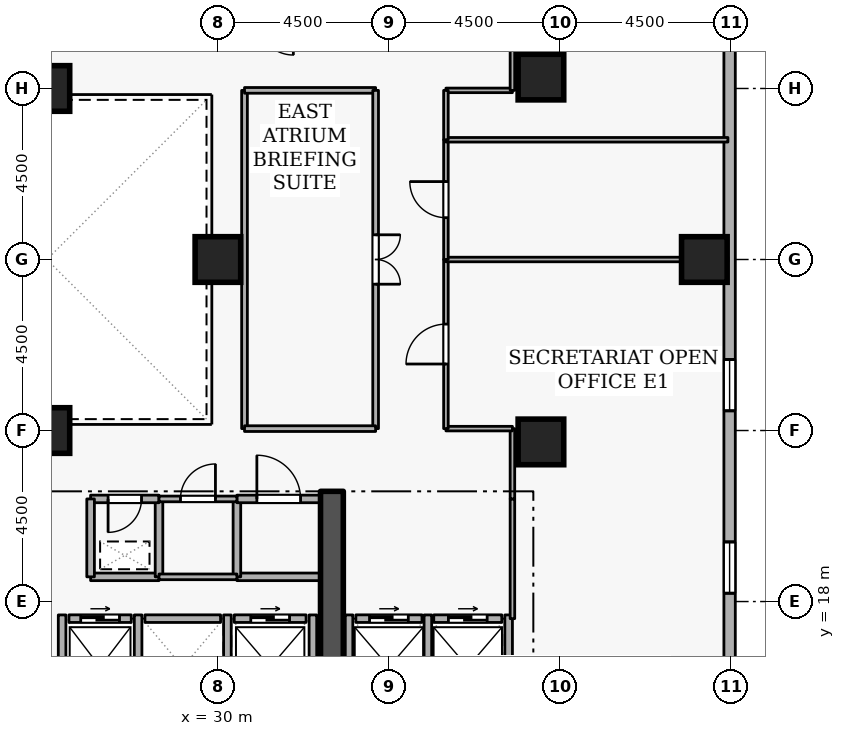
"""IFC4 building model, lengths in metres.
Left out: names, types, materials, properties, quantities, classifications, styles, units other than length and angle.
Written with IfcOpenShell. Run it as: python <this file> out.ifc"""

import sys

from ifc_helpers import new_model, si_unit, direction, frame, frame_2d, origin, origin_2d, place, context, subcontext, project, spatial, rectangle, extrude, element, fill, save


model = new_model("IFC4")
c1 = context("Model", 3, precision=1e-05, world=origin(), true_north=direction((0.0, 1.0)))
c2 = subcontext(c1, "Body", "Model", "MODEL_VIEW")
j1 = project(units=[si_unit("LENGTHUNIT", "METRE"), si_unit("PLANEANGLEUNIT", "RADIAN")], contexts=[c1])
p1 = place(None, origin())
s1 = spatial("IfcSite", under=j1, at=p1, CompositionType="ELEMENT")
p2 = place(p1, origin())
s2 = spatial("IfcBuilding", under=s1, at=p2, CompositionType="ELEMENT")
p3 = place(p2, frame((0.0, 0.0, 116.1)))
s3 = spatial("IfcBuildingStorey", under=s2, at=p3, CompositionType="ELEMENT", Elevation=116.1)
p4 = place(p3, frame((33.0, 15.2, 0.0), z_axis=(0.0, 0.0, 1.0), x_axis=(0.0, 1.0, 0.0)))
e1 = element("IfcWall", 1, at=p4, inside=s3, PredefinedType="SHEAR", context=c2, shape_type="SweptSolid", body=[
    extrude(rectangle(XDim=5.7, YDim=0.6, at=frame_2d((2.85, 0.0))), origin(), (0.0, 0.0, 1.0), 3.6),
])
for number, where, z_axis, x_axis in (
    (2, (42.8, 27.0, 0.0), (0.0, 0.0, 1.0), (1.0, 0.0, 0.0)),
    (3, (38.5, 22.2, 0.0), (0.0, 0.0, 1.0), (1.0, 0.0, 0.0)),
    (4, (38.5, 31.8, 0.0), (0.0, 0.0, 1.0), (1.0, 0.0, 0.0)),
    (5, (25.5, 22.5, 0.0), (0.0, 0.0, 1.0), (1.0, 0.0, 0.0)),
    (6, (25.5, 31.5, 0.0), (0.0, 0.0, 1.0), (1.0, 0.0, 0.0)),
    (7, (30.0, 27.0, 0.0), (0.0, 0.0, 1.0), (1.0, 0.0, 0.0)),
):
    element("IfcColumn", number, at=place(p3, frame(where, z_axis=z_axis, x_axis=x_axis)), inside=s3, PredefinedType="COLUMN", context=c2, shape_type="SweptSolid", body=[
        extrude(rectangle(XDim=1.2, YDim=1.2, at=origin_2d()), origin(), (0.0, 0.0, 1.0), 3.6),
    ])
p5 = place(p3, frame((43.465, 11.619, 0.0), z_axis=(0.0, 0.0, 1.0), x_axis=(0.0, 1.0, 0.0)))
e8 = element("IfcWall", 8, at=p5, inside=s3, PredefinedType="STANDARD", context=c2, shape_type="SweptSolid", body=[
    extrude(rectangle(XDim=36.763, YDim=0.3, at=frame_2d((18.381, 0.0))), origin(), (0.0, 0.0, 1.0), 2.22),
])
p6 = place(p5, frame((6.6, 0.0, 0.72)))
e9 = element("IfcOpeningElement", 9, at=p6, cuts=e8, PredefinedType="OPENING", context=c2, shape_type="SweptSolid", body=[
    extrude(rectangle(XDim=1.35, YDim=1.05, at=frame_2d((0.675, 0.525))), frame((0.0, 0.16, 0.0), z_axis=(0.0, -1.0, 0.0), x_axis=(1.0, 0.0, 0.0)), (0.0, 0.0, 1.0), 0.32),
])
p7 = place(p5, frame((11.4, 0.0, 0.72)))
e10 = element("IfcOpeningElement", 10, at=p7, cuts=e8, PredefinedType="OPENING", context=c2, shape_type="SweptSolid", body=[
    extrude(rectangle(XDim=1.35, YDim=1.05, at=frame_2d((0.675, 0.525))), frame((0.0, 0.16, 0.0), z_axis=(0.0, -1.0, 0.0), x_axis=(1.0, 0.0, 0.0)), (0.0, 0.0, 1.0), 0.32),
])
p8 = place(p5, frame((21.0, 0.0, 0.72)))
e11 = element("IfcOpeningElement", 11, at=p8, cuts=e8, PredefinedType="OPENING", context=c2, shape_type="SweptSolid", body=[
    extrude(rectangle(XDim=1.35, YDim=1.05, at=frame_2d((0.675, 0.525))), frame((0.0, 0.16, 0.0), z_axis=(0.0, -1.0, 0.0), x_axis=(1.0, 0.0, 0.0)), (0.0, 0.0, 1.0), 0.32),
])
p9 = place(p5, frame((25.8, 0.0, 0.72)))
e12 = element("IfcOpeningElement", 12, at=p9, cuts=e8, PredefinedType="OPENING", context=c2, shape_type="SweptSolid", body=[
    extrude(rectangle(XDim=1.35, YDim=1.05, at=frame_2d((0.675, 0.525))), frame((0.0, 0.16, 0.0), z_axis=(0.0, -1.0, 0.0), x_axis=(1.0, 0.0, 0.0)), (0.0, 0.0, 1.0), 0.32),
])
p10 = place(p3, frame((26.08, 17.55, 0.0), z_axis=(0.0, 0.0, 1.0), x_axis=(1.0, 0.0, 0.0)))
e13 = element("IfcWall", 13, at=p10, inside=s3, PredefinedType="STANDARD", context=c2, shape_type="SweptSolid", body=[
    extrude(rectangle(XDim=1.64, YDim=0.2, at=frame_2d((0.82, 0.0))), origin(), (0.0, 0.0, 1.0), 3.32),
])
p11 = place(p10, frame((0.31, 0.0, 0.0)))
e14 = element("IfcOpeningElement", 14, at=p11, cuts=e13, PredefinedType="OPENING", context=c2, shape_type="SweptSolid", body=[
    extrude(rectangle(XDim=1.02, YDim=2.06, at=frame_2d((0.51, 1.03))), frame((0.0, 0.11, 0.0), z_axis=(0.0, -1.0, 0.0), x_axis=(1.0, 0.0, 0.0)), (0.0, 0.0, 1.0), 0.22),
])
p12 = place(p3, frame((28.08, 17.55, 0.0), z_axis=(0.0, 0.0, 1.0), x_axis=(1.0, 0.0, 0.0)))
e15 = element("IfcWall", 15, at=p12, inside=s3, PredefinedType="STANDARD", context=c2, shape_type="SweptSolid", body=[
    extrude(rectangle(XDim=1.99, YDim=0.2, at=frame_2d((0.995, 0.0))), origin(), (0.0, 0.0, 1.0), 3.32),
])
p13 = place(p3, frame((30.43, 17.55, 0.0), z_axis=(0.0, 0.0, 1.0), x_axis=(1.0, 0.0, 0.0)))
e16 = element("IfcWall", 16, at=p13, inside=s3, PredefinedType="STANDARD", context=c2, shape_type="SweptSolid", body=[
    extrude(rectangle(XDim=1.89, YDim=0.2, at=frame_2d((0.945, 0.0))), origin(), (0.0, 0.0, 1.0), 3.32),
])
p14 = place(p13, frame((0.435, 0.0, 0.0)))
e17 = element("IfcOpeningElement", 17, at=p14, cuts=e16, PredefinedType="OPENING", context=c2, shape_type="SweptSolid", body=[
    extrude(rectangle(XDim=1.02, YDim=2.06, at=frame_2d((0.51, 1.03))), frame((0.0, 0.11, 0.0), z_axis=(0.0, -1.0, 0.0), x_axis=(1.0, 0.0, 0.0)), (0.0, 0.0, 1.0), 0.22),
])
p15 = place(p3, frame((33.63, 17.55, 0.0), z_axis=(0.0, 0.0, 1.0), x_axis=(1.0, 0.0, 0.0)))
e18 = element("IfcWall", 18, at=p15, inside=s3, PredefinedType="STANDARD", context=c2, shape_type="SweptSolid", body=[
    extrude(rectangle(XDim=1.74, YDim=0.2, at=frame_2d((0.87, 0.0))), origin(), (0.0, 0.0, 1.0), 3.32),
])
p16 = place(p15, frame((0.36, 0.0, 0.0)))
e19 = element("IfcOpeningElement", 19, at=p16, cuts=e18, PredefinedType="OPENING", context=c2, shape_type="SweptSolid", body=[
    extrude(rectangle(XDim=1.02, YDim=2.06, at=frame_2d((0.51, 1.03))), frame((0.0, 0.11, 0.0), z_axis=(0.0, -1.0, 0.0), x_axis=(1.0, 0.0, 0.0)), (0.0, 0.0, 1.0), 0.22),
])
p17 = place(p3, frame((35.68, 17.55, 0.0), z_axis=(0.0, 0.0, 1.0), x_axis=(1.0, 0.0, 0.0)))
e20 = element("IfcWall", 20, at=p17, inside=s3, PredefinedType="STANDARD", context=c2, shape_type="SweptSolid", body=[
    extrude(rectangle(XDim=1.79, YDim=0.2, at=frame_2d((0.895, 0.0))), origin(), (0.0, 0.0, 1.0), 3.32),
])
p18 = place(p17, frame((0.385, 0.0, 0.0)))
e21 = element("IfcOpeningElement", 21, at=p18, cuts=e20, PredefinedType="OPENING", context=c2, shape_type="SweptSolid", body=[
    extrude(rectangle(XDim=1.02, YDim=2.06, at=frame_2d((0.51, 1.03))), frame((0.0, 0.11, 0.0), z_axis=(0.0, -1.0, 0.0), x_axis=(1.0, 0.0, 0.0)), (0.0, 0.0, 1.0), 0.22),
])
p19 = place(p3, frame((27.9, 15.212, 0.0), z_axis=(0.0, 0.0, 1.0), x_axis=(0.0, 1.0, 0.0)))
e22 = element("IfcWall", 22, at=p19, inside=s3, PredefinedType="STANDARD", context=c2, shape_type="SweptSolid", body=[
    extrude(rectangle(XDim=2.436, YDim=0.2, at=frame_2d((1.218, 0.0))), origin(), (0.0, 0.0, 1.0), 3.32),
])
p20 = place(p3, frame((25.9, 15.212, 0.0), z_axis=(0.0, 0.0, 1.0), x_axis=(0.0, 1.0, 0.0)))
e23 = element("IfcWall", 23, at=p20, inside=s3, PredefinedType="STANDARD", context=c2, shape_type="SweptSolid", body=[
    extrude(rectangle(XDim=2.436, YDim=0.2, at=frame_2d((1.218, 0.0))), origin(), (0.0, 0.0, 1.0), 1.685),
])
for number, where, z_axis, x_axis in (
    (24, (30.25, 15.212, 0.0), (0.0, 0.0, 1.0), (0.0, 1.0, 0.0)),
    (25, (32.5, 15.212, 0.0), (0.0, 0.0, 1.0), (0.0, 1.0, 0.0)),
):
    element("IfcWall", number, at=place(p3, frame(where, z_axis=z_axis, x_axis=x_axis)), inside=s3, PredefinedType="STANDARD", context=c2, shape_type="SweptSolid", body=[
        extrude(rectangle(XDim=2.436, YDim=0.2, at=frame_2d((1.218, 0.0))), origin(), (0.0, 0.0, 1.0), 3.32),
    ])
for number, where, z_axis, x_axis in (
    (26, (35.525, 15.012, 0.0), (0.0, 0.0, 1.0), (0.0, 1.0, 0.0)),
    (27, (33.45, 15.012, 0.0), (0.0, 0.0, 1.0), (0.0, 1.0, 0.0)),
    (28, (37.65, 15.012, 0.0), (0.0, 0.0, 1.0), (0.0, 1.0, 0.0)),
):
    element("IfcWall", number, at=place(p3, frame(where, z_axis=z_axis, x_axis=x_axis)), inside=s3, PredefinedType="STANDARD", context=c2, shape_type="SweptSolid", body=[
        extrude(rectangle(XDim=2.636, YDim=0.2, at=frame_2d((1.318, 0.0))), origin(), (0.0, 0.0, 1.0), 3.32),
    ])
p21 = place(p3, frame((26.65, 18.65, 0.0), z_axis=(0.0, 0.0, 1.0), x_axis=(1.0, 0.0, 0.0)))
e29 = element("IfcWall", 29, at=p21, inside=s3, PredefinedType="STANDARD", context=c2, shape_type="SweptSolid", body=[
    extrude(rectangle(XDim=1.8, YDim=0.2, at=frame_2d((0.9, 0.0))), origin(), (0.0, 0.0, 1.0), 3.32),
])
p22 = place(p3, frame((28.45, 18.65, 0.0), z_axis=(0.0, 0.0, 1.0), x_axis=(0.0, 1.0, 0.0)))
e30 = element("IfcWall", 30, at=p22, inside=s3, PredefinedType="STANDARD", context=c2, shape_type="SweptSolid", body=[
    extrude(rectangle(XDim=2.05, YDim=0.2, at=frame_2d((1.025, 0.0))), origin(), (0.0, 0.0, 1.0), 3.32),
])
p23 = place(p3, frame((28.45, 20.7, 0.0), z_axis=(0.0, 0.0, 1.0), x_axis=(-1.0, 0.0, 0.0)))
e31 = element("IfcWall", 31, at=p23, inside=s3, PredefinedType="STANDARD", context=c2, shape_type="SweptSolid", body=[
    extrude(rectangle(XDim=1.8, YDim=0.2, at=frame_2d((0.9, 0.0))), origin(), (0.0, 0.0, 1.0), 3.32),
])
p24 = place(p23, frame((0.46, 0.0, 0.0)))
e32 = element("IfcOpeningElement", 32, at=p24, cuts=e31, PredefinedType="OPENING", context=c2, shape_type="SweptSolid", body=[
    extrude(rectangle(XDim=0.88, YDim=2.04, at=frame_2d((0.44, 1.02))), frame((0.0, 0.11, 0.0), z_axis=(0.0, -1.0, 0.0), x_axis=(1.0, 0.0, 0.0)), (0.0, 0.0, 1.0), 0.22),
])
p25 = place(p3, frame((26.65, 20.7, 0.0), z_axis=(0.0, 0.0, 1.0), x_axis=(0.0, -1.0, 0.0)))
e33 = element("IfcWall", 33, at=p25, inside=s3, PredefinedType="STANDARD", context=c2, shape_type="SweptSolid", body=[
    extrude(rectangle(XDim=2.05, YDim=0.2, at=frame_2d((1.025, 0.0))), origin(), (0.0, 0.0, 1.0), 3.32),
])
p26 = place(p3, frame((32.7, 18.65, 0.0), z_axis=(0.0, 0.0, 1.0), x_axis=(-1.0, 0.0, 0.0)))
e34 = element("IfcWall", 34, at=p26, inside=s3, PredefinedType="STANDARD", context=c2, shape_type="SweptSolid", body=[
    extrude(rectangle(XDim=2.2, YDim=0.2, at=frame_2d((1.1, 0.0))), origin(), (0.0, 0.0, 1.0), 3.32),
])
p27 = place(p3, frame((30.5, 18.65, 0.0), z_axis=(0.0, 0.0, 1.0), x_axis=(0.0, 1.0, 0.0)))
e35 = element("IfcWall", 35, at=p27, inside=s3, PredefinedType="STANDARD", context=c2, shape_type="SweptSolid", body=[
    extrude(rectangle(XDim=2.05, YDim=0.2, at=frame_2d((1.025, 0.0))), origin(), (0.0, 0.0, 1.0), 3.32),
])
p28 = place(p3, frame((30.5, 20.7, 0.0), z_axis=(0.0, 0.0, 1.0), x_axis=(1.0, 0.0, 0.0)))
e36 = element("IfcWall", 36, at=p28, inside=s3, PredefinedType="STANDARD", context=c2, shape_type="SweptSolid", body=[
    extrude(rectangle(XDim=2.2, YDim=0.2, at=frame_2d((1.1, 0.0))), origin(), (0.0, 0.0, 1.0), 3.32),
])
p29 = place(p28, frame((0.525, 0.0, 0.0)))
e37 = element("IfcOpeningElement", 37, at=p29, cuts=e36, PredefinedType="OPENING", context=c2, shape_type="SweptSolid", body=[
    extrude(rectangle(XDim=1.15, YDim=2.1, at=frame_2d((0.575, 1.05))), frame((0.0, 0.11, 0.0), z_axis=(0.0, -1.0, 0.0), x_axis=(1.0, 0.0, 0.0)), (0.0, 0.0, 1.0), 0.22),
])
p30 = place(p3, frame((30.5, 18.65, 0.0), z_axis=(0.0, 0.0, 1.0), x_axis=(-1.0, 0.0, 0.0)))
e38 = element("IfcWall", 38, at=p30, inside=s3, PredefinedType="PARTITIONING", context=c2, shape_type="SweptSolid", body=[
    extrude(rectangle(XDim=2.05, YDim=0.15, at=frame_2d((1.025, 0.0))), origin(), (0.0, 0.0, 1.0), 3.32),
])
p31 = place(p3, frame((28.45, 20.7, 0.0), z_axis=(0.0, 0.0, 1.0), x_axis=(1.0, 0.0, 0.0)))
e39 = element("IfcWall", 39, at=p31, inside=s3, PredefinedType="PARTITIONING", context=c2, shape_type="SweptSolid", body=[
    extrude(rectangle(XDim=2.05, YDim=0.15, at=frame_2d((1.025, 0.0))), origin(), (0.0, 0.0, 1.0), 3.32),
])
p32 = place(p31, frame((0.565, 0.0, 0.0)))
e40 = element("IfcOpeningElement", 40, at=p32, cuts=e39, PredefinedType="OPENING", context=c2, shape_type="SweptSolid", body=[
    extrude(rectangle(XDim=0.92, YDim=2.08, at=frame_2d((0.46, 1.04))), frame((0.0, 0.085, 0.0), z_axis=(0.0, -1.0, 0.0), x_axis=(1.0, 0.0, 0.0)), (0.0, 0.0, 1.0), 0.17),
])
p33 = place(p3, frame((37.75, 17.55, 0.0), z_axis=(0.0, 0.0, 1.0), x_axis=(0.0, 1.0, 0.0)))
e41 = element("IfcWall", 41, at=p33, inside=s3, PredefinedType="PARTITIONING", context=c2, shape_type="SweptSolid", body=[
    extrude(rectangle(XDim=3.15, YDim=0.12, at=frame_2d((1.575, 0.0))), origin(), (0.0, 0.0, 1.0), 3.32),
])
p34 = place(p3, frame((37.75, 20.7, 0.0), z_axis=(0.0, 0.0, 1.0), x_axis=(0.0, 1.0, 0.0)))
e42 = element("IfcWall", 42, at=p34, inside=s3, PredefinedType="PARTITIONING", context=c2, shape_type="SweptSolid", body=[
    extrude(rectangle(XDim=1.85, YDim=0.12, at=frame_2d((0.925, 0.0))), origin(), (0.0, 0.0, 1.0), 3.32),
])
p35 = place(p3, frame((37.75, 22.55, 0.0), z_axis=(0.0, 0.0, 1.0), x_axis=(-1.0, 0.0, 0.0)))
e43 = element("IfcWall", 43, at=p35, inside=s3, PredefinedType="PARTITIONING", context=c2, shape_type="SweptSolid", body=[
    extrude(rectangle(XDim=1.75, YDim=0.12, at=frame_2d((0.875, 0.0))), origin(), (0.0, 0.0, 1.0), 3.32),
])
p36 = place(p3, frame((36.0, 22.55, 0.0), z_axis=(0.0, 0.0, 1.0), x_axis=(0.0, 1.0, 0.0)))
e44 = element("IfcWall", 44, at=p36, inside=s3, PredefinedType="PARTITIONING", context=c2, shape_type="SweptSolid", body=[
    extrude(rectangle(XDim=4.45, YDim=0.12, at=frame_2d((2.225, 0.0))), origin(), (0.0, 0.0, 1.0), 3.32),
])
p37 = place(p36, frame((1.7, 0.0, 0.0)))
e45 = element("IfcOpeningElement", 45, at=p37, cuts=e44, PredefinedType="OPENING", context=c2, shape_type="SweptSolid", body=[
    extrude(rectangle(XDim=1.05, YDim=2.1, at=frame_2d((0.525, 1.05))), frame((0.0, 0.07, 0.0), z_axis=(0.0, -1.0, 0.0), x_axis=(1.0, 0.0, 0.0)), (0.0, 0.0, 1.0), 0.14),
])
p38 = place(p3, frame((36.0, 27.0, 0.0), z_axis=(0.0, 0.0, 1.0), x_axis=(1.0, 0.0, 0.0)))
e46 = element("IfcWall", 46, at=p38, inside=s3, PredefinedType="PARTITIONING", context=c2, shape_type="SweptSolid", body=[
    extrude(rectangle(XDim=7.42, YDim=0.12, at=frame_2d((3.71, 0.0))), origin(), (0.0, 0.0, 1.0), 2.862),
])
p39 = place(p3, frame((36.0, 27.0, 0.0), z_axis=(0.0, 0.0, 1.0), x_axis=(0.0, 1.0, 0.0)))
e47 = element("IfcWall", 47, at=p39, inside=s3, PredefinedType="PARTITIONING", context=c2, shape_type="SweptSolid", body=[
    extrude(rectangle(XDim=3.15, YDim=0.12, at=frame_2d((1.575, 0.0))), origin(), (0.0, 0.0, 1.0), 3.32),
])
p40 = place(p39, frame((1.1, 0.0, 0.0)))
e48 = element("IfcOpeningElement", 48, at=p40, cuts=e47, PredefinedType="OPENING", context=c2, shape_type="SweptSolid", body=[
    extrude(rectangle(XDim=0.95, YDim=2.1, at=frame_2d((0.475, 1.05))), frame((0.0, 0.07, 0.0), z_axis=(0.0, -1.0, 0.0), x_axis=(1.0, 0.0, 0.0)), (0.0, 0.0, 1.0), 0.14),
])
p41 = place(p3, frame((36.0, 30.15, 0.0), z_axis=(0.0, 0.0, 1.0), x_axis=(1.0, 0.0, 0.0)))
e49 = element("IfcWall", 49, at=p41, inside=s3, PredefinedType="PARTITIONING", context=c2, shape_type="SweptSolid", body=[
    extrude(rectangle(XDim=7.42, YDim=0.12, at=frame_2d((3.71, 0.0))), origin(), (0.0, 0.0, 1.0), 3.32),
])
p42 = place(p3, frame((36.0, 31.45, 0.0), z_axis=(0.0, 0.0, 1.0), x_axis=(1.0, 0.0, 0.0)))
e50 = element("IfcWall", 50, at=p42, inside=s3, PredefinedType="PARTITIONING", context=c2, shape_type="SweptSolid", body=[
    extrude(rectangle(XDim=1.75, YDim=0.12, at=frame_2d((0.875, 0.0))), origin(), (0.0, 0.0, 1.0), 3.32),
])
p43 = place(p3, frame((37.75, 31.45, 0.0), z_axis=(0.0, 0.0, 1.0), x_axis=(0.0, 1.0, 0.0)))
e51 = element("IfcWall", 51, at=p43, inside=s3, PredefinedType="PARTITIONING", context=c2, shape_type="SweptSolid", body=[
    extrude(rectangle(XDim=1.85, YDim=0.12, at=frame_2d((0.925, 0.0))), origin(), (0.0, 0.0, 1.0), 3.32),
])
p44 = place(p3, frame((36.0, 30.15, 0.0), z_axis=(0.0, 0.0, 1.0), x_axis=(0.0, 1.0, 0.0)))
e52 = element("IfcWall", 52, at=p44, inside=s3, PredefinedType="PARTITIONING", context=c2, shape_type="SweptSolid", body=[
    extrude(rectangle(XDim=1.3, YDim=0.12, at=frame_2d((0.65, 0.0))), origin(), (0.0, 0.0, 1.0), 3.32),
])
p45 = place(p3, frame((30.7, 22.55, 0.0), z_axis=(0.0, 0.0, 1.0), x_axis=(0.0, 1.0, 0.0)))
e53 = element("IfcWall", 53, at=p45, inside=s3, PredefinedType="PARTITIONING", context=c2, shape_type="SweptSolid", body=[
    extrude(rectangle(XDim=8.9, YDim=0.15, at=frame_2d((4.45, 0.0))), origin(), (0.0, 0.0, 1.0), 3.32),
])
p46 = place(p3, frame((30.7, 31.45, 0.0), z_axis=(0.0, 0.0, 1.0), x_axis=(1.0, 0.0, 0.0)))
e54 = element("IfcWall", 54, at=p46, inside=s3, PredefinedType="PARTITIONING", context=c2, shape_type="SweptSolid", body=[
    extrude(rectangle(XDim=3.45, YDim=0.15, at=frame_2d((1.725, 0.0))), origin(), (0.0, 0.0, 1.0), 3.32),
])
p47 = place(p3, frame((34.15, 31.45, 0.0), z_axis=(0.0, 0.0, 1.0), x_axis=(0.0, -1.0, 0.0)))
e55 = element("IfcWall", 55, at=p47, inside=s3, PredefinedType="PARTITIONING", context=c2, shape_type="SweptSolid", body=[
    extrude(rectangle(XDim=8.9, YDim=0.15, at=frame_2d((4.45, 0.0))), origin(), (0.0, 0.0, 1.0), 3.32),
])
p48 = place(p47, frame((3.8, 0.0, 0.0)))
e56 = element("IfcOpeningElement", 56, at=p48, cuts=e55, PredefinedType="OPENING", context=c2, shape_type="SweptSolid", body=[
    extrude(rectangle(XDim=1.3, YDim=2.12, at=frame_2d((0.65, 1.06))), frame((0.0, 0.085, 0.0), z_axis=(0.0, -1.0, 0.0), x_axis=(1.0, 0.0, 0.0)), (0.0, 0.0, 1.0), 0.17),
])
p49 = place(p3, frame((34.15, 22.55, 0.0), z_axis=(0.0, 0.0, 1.0), x_axis=(-1.0, 0.0, 0.0)))
e57 = element("IfcWall", 57, at=p49, inside=s3, PredefinedType="PARTITIONING", context=c2, shape_type="SweptSolid", body=[
    extrude(rectangle(XDim=3.45, YDim=0.15, at=frame_2d((1.725, 0.0))), origin(), (0.0, 0.0, 1.0), 3.32),
])
p50 = place(p6, origin())
e58 = element("IfcWindow", 58, at=p50, inside=s3, PartitioningType="SINGLE_PANEL", PredefinedType="WINDOW", context=c2, shape_type="SweptSolid", body=[
    extrude(rectangle(XDim=1.35, YDim=1.05, at=frame_2d((0.675, 0.525))), frame((0.0, 0.03, 0.0), z_axis=(0.0, -1.0, 0.0), x_axis=(1.0, 0.0, 0.0)), (0.0, 0.0, 1.0), 0.06),
])
fill(e9, e58)
p51 = place(p7, origin())
e59 = element("IfcWindow", 59, at=p51, inside=s3, PartitioningType="SINGLE_PANEL", PredefinedType="WINDOW", context=c2, shape_type="SweptSolid", body=[
    extrude(rectangle(XDim=1.35, YDim=1.05, at=frame_2d((0.675, 0.525))), frame((0.0, 0.03, 0.0), z_axis=(0.0, -1.0, 0.0), x_axis=(1.0, 0.0, 0.0)), (0.0, 0.0, 1.0), 0.06),
])
fill(e10, e59)
p52 = place(p11, origin())
e60 = element("IfcDoor", 60, at=p52, inside=s3, OperationType="SLIDING_TO_LEFT", PredefinedType="DOOR", context=c2, shape_type="SweptSolid", body=[
    extrude(rectangle(XDim=1.02, YDim=2.06, at=frame_2d((0.51, 1.03))), frame((0.0, 0.025, 0.0), z_axis=(0.0, -1.0, 0.0), x_axis=(1.0, 0.0, 0.0)), (0.0, 0.0, 1.0), 0.05),
])
fill(e14, e60)
p53 = place(p14, origin())
e61 = element("IfcDoor", 61, at=p53, inside=s3, OperationType="SLIDING_TO_LEFT", PredefinedType="DOOR", context=c2, shape_type="SweptSolid", body=[
    extrude(rectangle(XDim=1.02, YDim=2.06, at=frame_2d((0.51, 1.03))), frame((0.0, 0.025, 0.0), z_axis=(0.0, -1.0, 0.0), x_axis=(1.0, 0.0, 0.0)), (0.0, 0.0, 1.0), 0.05),
])
fill(e17, e61)
p54 = place(p16, origin())
e62 = element("IfcDoor", 62, at=p54, inside=s3, OperationType="SLIDING_TO_LEFT", PredefinedType="DOOR", context=c2, shape_type="SweptSolid", body=[
    extrude(rectangle(XDim=1.02, YDim=2.06, at=frame_2d((0.51, 1.03))), frame((0.0, 0.025, 0.0), z_axis=(0.0, -1.0, 0.0), x_axis=(1.0, 0.0, 0.0)), (0.0, 0.0, 1.0), 0.05),
])
fill(e19, e62)
p55 = place(p18, origin())
e63 = element("IfcDoor", 63, at=p55, inside=s3, OperationType="SLIDING_TO_LEFT", PredefinedType="DOOR", context=c2, shape_type="SweptSolid", body=[
    extrude(rectangle(XDim=1.02, YDim=2.06, at=frame_2d((0.51, 1.03))), frame((0.0, 0.025, 0.0), z_axis=(0.0, -1.0, 0.0), x_axis=(1.0, 0.0, 0.0)), (0.0, 0.0, 1.0), 0.05),
])
fill(e21, e63)
p56 = place(p24, origin())
e64 = element("IfcDoor", 64, at=p56, inside=s3, OperationType="SINGLE_SWING_RIGHT", PredefinedType="DOOR", context=c2, shape_type="SweptSolid", body=[
    extrude(rectangle(XDim=0.88, YDim=2.04, at=frame_2d((0.44, 1.02))), frame((0.0, 0.025, 0.0), z_axis=(0.0, -1.0, 0.0), x_axis=(1.0, 0.0, 0.0)), (0.0, 0.0, 1.0), 0.05),
])
fill(e32, e64)
p57 = place(p32, origin())
e65 = element("IfcDoor", 65, at=p57, inside=s3, OperationType="SINGLE_SWING_RIGHT", PredefinedType="DOOR", context=c2, shape_type="SweptSolid", body=[
    extrude(rectangle(XDim=0.92, YDim=2.08, at=frame_2d((0.46, 1.04))), frame((0.0, 0.025, 0.0), z_axis=(0.0, -1.0, 0.0), x_axis=(1.0, 0.0, 0.0)), (0.0, 0.0, 1.0), 0.05),
])
fill(e40, e65)
p58 = place(p29, origin())
e66 = element("IfcDoor", 66, at=p58, inside=s3, OperationType="SINGLE_SWING_LEFT", PredefinedType="DOOR", context=c2, shape_type="SweptSolid", body=[
    extrude(rectangle(XDim=1.15, YDim=2.1, at=frame_2d((0.575, 1.05))), frame((0.0, 0.025, 0.0), z_axis=(0.0, -1.0, 0.0), x_axis=(1.0, 0.0, 0.0)), (0.0, 0.0, 1.0), 0.05),
])
fill(e37, e66)
p59 = place(p37, origin())
e67 = element("IfcDoor", 67, at=p59, inside=s3, OperationType="SINGLE_SWING_LEFT", PredefinedType="DOOR", context=c2, shape_type="SweptSolid", body=[
    extrude(rectangle(XDim=1.05, YDim=2.1, at=frame_2d((0.525, 1.05))), frame((0.0, 0.025, 0.0), z_axis=(0.0, -1.0, 0.0), x_axis=(1.0, 0.0, 0.0)), (0.0, 0.0, 1.0), 0.05),
])
fill(e45, e67)
p60 = place(p40, origin())
e68 = element("IfcDoor", 68, at=p60, inside=s3, OperationType="SINGLE_SWING_RIGHT", PredefinedType="DOOR", context=c2, shape_type="SweptSolid", body=[
    extrude(rectangle(XDim=0.95, YDim=2.1, at=frame_2d((0.475, 1.05))), frame((0.0, 0.025, 0.0), z_axis=(0.0, -1.0, 0.0), x_axis=(1.0, 0.0, 0.0)), (0.0, 0.0, 1.0), 0.05),
])
fill(e48, e68)
p61 = place(p48, origin())
e69 = element("IfcDoor", 69, at=p61, inside=s3, OperationType="DOUBLE_DOOR_SINGLE_SWING", PredefinedType="DOOR", context=c2, shape_type="SweptSolid", body=[
    extrude(rectangle(XDim=1.3, YDim=2.12, at=frame_2d((0.65, 1.06))), frame((0.0, 0.025, 0.0), z_axis=(0.0, -1.0, 0.0), x_axis=(1.0, 0.0, 0.0)), (0.0, 0.0, 1.0), 0.05),
])
fill(e56, e69)
save(model, sys.argv[1])
